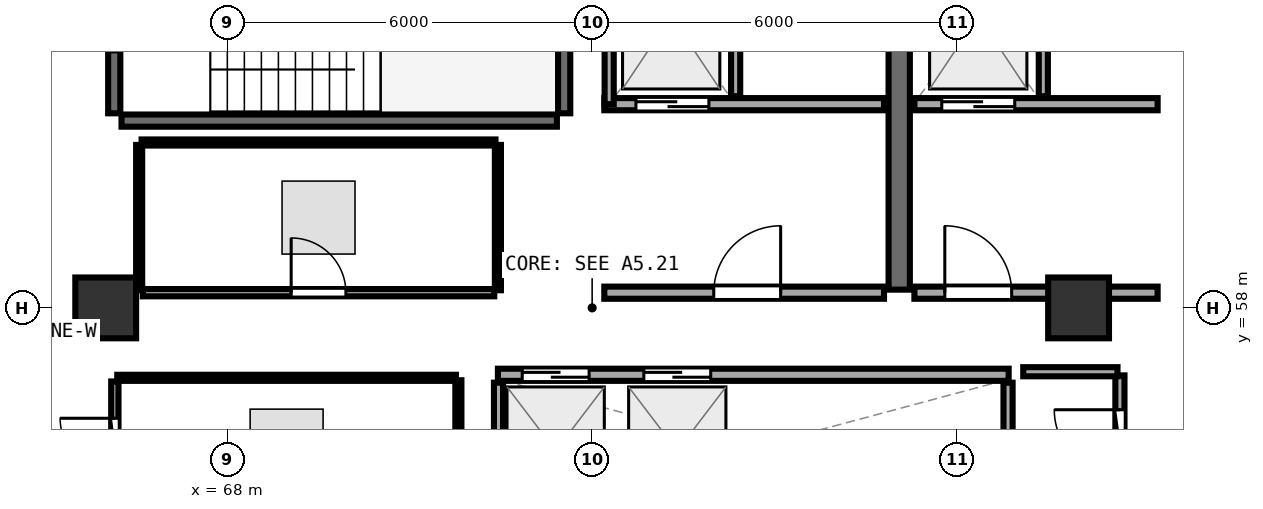
"""IFC4 building model, lengths in metres.
Left out: names, types, materials, properties, quantities, classifications, styles, units other than length and angle.
Written with IfcOpenShell. Run it as: python <this file> out.ifc"""

import sys

from ifc_helpers import new_model, si_unit, direction, frame, frame_2d, origin, origin_2d, place, context, subcontext, project, spatial, rectangle, extrude, element, fill, save


model = new_model("IFC4")
c1 = context("Model", 3, precision=1e-05, world=origin(), true_north=direction((0.0, 1.0)))
c2 = subcontext(c1, "Body", "Model", "MODEL_VIEW")
j1 = project(units=[si_unit("LENGTHUNIT", "METRE"), si_unit("PLANEANGLEUNIT", "RADIAN")], contexts=[c1])
p1 = place(None, origin())
s1 = spatial("IfcSite", under=j1, at=p1, CompositionType="ELEMENT")
p2 = place(p1, origin())
s2 = spatial("IfcBuilding", under=s1, at=p2, CompositionType="ELEMENT")
p3 = place(p2, frame((0.0, 0.0, 289.95)))
s3 = spatial("IfcBuildingStorey", under=s2, at=p3, CompositionType="ELEMENT", Elevation=289.95)
for number, where, z_axis, x_axis in (
    (1, (82.0, 58.0, 0.0), (0.0, 0.0, 1.0), (1.0, 0.0, 0.0)),
    (2, (66.0, 58.0, 0.0), (0.0, 0.0, 1.0), (1.0, 0.0, 0.0)),
):
    element("IfcColumn", number, at=place(p3, frame(where, z_axis=z_axis, x_axis=x_axis)), inside=s3, PredefinedType="PILASTER", context=c2, shape_type="SweptSolid", body=[
        extrude(rectangle(XDim=1.0, YDim=1.0, at=origin_2d()), origin(), (0.0, 0.0, 1.0), 3.75),
    ])
p4 = place(p3, frame((66.26, 61.08, 0.0), z_axis=(0.0, 0.0, 1.0), x_axis=(1.0, 0.0, 0.0)))
e3 = element("IfcWall", 3, at=p4, inside=s3, PredefinedType="SHEAR", context=c2, shape_type="SweptSolid", body=[
    extrude(rectangle(XDim=7.16, YDim=0.2, at=frame_2d((3.58, 0.0))), origin(), (0.0, 0.0, 1.0), 3.43),
])
p5 = place(p3, frame((73.54, 61.2, 0.0), z_axis=(0.0, 0.0, 1.0), x_axis=(0.0, 1.0, 0.0)))
e4 = element("IfcWall", 4, at=p5, inside=s3, PredefinedType="SHEAR", context=c2, shape_type="SweptSolid", body=[
    extrude(rectangle(XDim=3.07, YDim=0.2, at=frame_2d((1.535, 0.0))), origin(), (0.0, 0.0, 1.0), 3.43),
])
p6 = place(p3, frame((66.14, 64.27, 0.0), z_axis=(0.0, 0.0, 1.0), x_axis=(0.0, -1.0, 0.0)))
e5 = element("IfcWall", 5, at=p6, inside=s3, PredefinedType="SHEAR", context=c2, shape_type="SweptSolid", body=[
    extrude(rectangle(XDim=3.07, YDim=0.2, at=frame_2d((1.535, 0.0))), origin(), (0.0, 0.0, 1.0), 3.43),
])
p7 = place(p6, frame((1.01, 0.0, 0.0)))
e6 = element("IfcOpeningElement", 6, at=p7, cuts=e5, PredefinedType="OPENING", context=c2, shape_type="SweptSolid", body=[
    extrude(rectangle(XDim=1.05, YDim=2.1, at=frame_2d((0.525, 1.05))), frame((0.0, 0.11, 0.0), z_axis=(0.0, -1.0, 0.0), x_axis=(1.0, 0.0, 0.0)), (0.0, 0.0, 1.0), 0.22),
])
p8 = place(p3, frame((79.05, 58.3, 0.0), z_axis=(0.0, 0.0, 1.0), x_axis=(0.0, 1.0, 0.0)))
e7 = element("IfcWall", 7, at=p8, inside=s3, PredefinedType="SHEAR", context=c2, shape_type="SweptSolid", body=[
    extrude(rectangle(XDim=6.3, YDim=0.35, at=frame_2d((3.15, 0.0))), origin(), (0.0, 0.0, 1.0), 3.43),
])
p9 = place(p3, frame((74.2, 61.35, 0.0), z_axis=(0.0, 0.0, 1.0), x_axis=(1.0, 0.0, 0.0)))
e8 = element("IfcWall", 8, at=p9, inside=s3, PredefinedType="SOLIDWALL", context=c2, shape_type="SweptSolid", body=[
    extrude(rectangle(XDim=4.6, YDim=0.2, at=frame_2d((2.3, 0.0))), origin(), (0.0, 0.0, 1.0), 3.42),
])
p10 = place(p9, frame((0.52, 0.0, 0.0)))
e9 = element("IfcOpeningElement", 9, at=p10, cuts=e8, PredefinedType="OPENING", context=c2, shape_type="SweptSolid", body=[
    extrude(rectangle(XDim=1.2, YDim=2.15, at=frame_2d((0.6, 1.075))), frame((0.0, 0.11, 0.0), z_axis=(0.0, -1.0, 0.0), x_axis=(1.0, 0.0, 0.0)), (0.0, 0.0, 1.0), 0.22),
])
p11 = place(p3, frame((74.28, 61.35, 0.0), z_axis=(0.0, 0.0, 1.0), x_axis=(0.0, 1.0, 0.0)))
e10 = element("IfcWall", 10, at=p11, inside=s3, PredefinedType="PARTITIONING", context=c2, shape_type="SweptSolid", body=[
    extrude(rectangle(XDim=2.97, YDim=0.15, at=frame_2d((1.485, 0.0))), origin(), (0.0, 0.0, 1.0), 3.42),
])
p12 = place(p3, frame((76.36, 61.48, 0.0), z_axis=(0.0, 0.0, 1.0), x_axis=(0.0, 1.0, 0.0)))
e11 = element("IfcWall", 11, at=p12, inside=s3, PredefinedType="PARTITIONING", context=c2, shape_type="SweptSolid", body=[
    extrude(rectangle(XDim=2.84, YDim=0.15, at=frame_2d((1.42, 0.0))), origin(), (0.0, 0.0, 1.0), 3.42),
])
p13 = place(p3, frame((79.3, 61.35, 0.0), z_axis=(0.0, 0.0, 1.0), x_axis=(1.0, 0.0, 0.0)))
e12 = element("IfcWall", 12, at=p13, inside=s3, PredefinedType="SOLIDWALL", context=c2, shape_type="SweptSolid", body=[
    extrude(rectangle(XDim=4.0, YDim=0.2, at=frame_2d((2.0, 0.0))), origin(), (0.0, 0.0, 1.0), 2.715),
])
p14 = place(p13, frame((0.45, 0.0, 0.0)))
e13 = element("IfcOpeningElement", 13, at=p14, cuts=e12, PredefinedType="OPENING", context=c2, shape_type="SweptSolid", body=[
    extrude(rectangle(XDim=1.2, YDim=2.15, at=frame_2d((0.6, 1.075))), frame((0.0, 0.11, 0.0), z_axis=(0.0, -1.0, 0.0), x_axis=(1.0, 0.0, 0.0)), (0.0, 0.0, 1.0), 0.22),
])
p15 = place(p3, frame((81.42, 61.48, 0.0), z_axis=(0.0, 0.0, 1.0), x_axis=(0.0, 1.0, 0.0)))
e14 = element("IfcWall", 14, at=p15, inside=s3, PredefinedType="PARTITIONING", context=c2, shape_type="SweptSolid", body=[
    extrude(rectangle(XDim=2.84, YDim=0.15, at=frame_2d((1.42, 0.0))), origin(), (0.0, 0.0, 1.0), 3.42),
])
p16 = place(p3, frame((74.2, 58.25, 0.0), z_axis=(0.0, 0.0, 1.0), x_axis=(1.0, 0.0, 0.0)))
e15 = element("IfcWall", 15, at=p16, inside=s3, PredefinedType="SOLIDWALL", context=c2, shape_type="SweptSolid", body=[
    extrude(rectangle(XDim=4.6, YDim=0.2, at=frame_2d((2.3, 0.0))), origin(), (0.0, 0.0, 1.0), 3.42),
])
p17 = place(p16, frame((1.8, 0.0, 0.0)))
e16 = element("IfcOpeningElement", 16, at=p17, cuts=e15, PredefinedType="OPENING", context=c2, shape_type="SweptSolid", body=[
    extrude(rectangle(XDim=1.1, YDim=2.1, at=frame_2d((0.55, 1.05))), frame((0.0, 0.11, 0.0), z_axis=(0.0, -1.0, 0.0), x_axis=(1.0, 0.0, 0.0)), (0.0, 0.0, 1.0), 0.22),
])
p18 = place(p3, frame((79.3, 58.25, 0.0), z_axis=(0.0, 0.0, 1.0), x_axis=(1.0, 0.0, 0.0)))
e17 = element("IfcWall", 17, at=p18, inside=s3, PredefinedType="SOLIDWALL", context=c2, shape_type="SweptSolid", body=[
    extrude(rectangle(XDim=4.0, YDim=0.2, at=frame_2d((2.0, 0.0))), origin(), (0.0, 0.0, 1.0), 2.715),
])
p19 = place(p18, frame((0.5, 0.0, 0.0)))
e18 = element("IfcOpeningElement", 18, at=p19, cuts=e17, PredefinedType="OPENING", context=c2, shape_type="SweptSolid", body=[
    extrude(rectangle(XDim=1.1, YDim=2.1, at=frame_2d((0.55, 1.05))), frame((0.0, 0.11, 0.0), z_axis=(0.0, -1.0, 0.0), x_axis=(1.0, 0.0, 0.0)), (0.0, 0.0, 1.0), 0.22),
])
p20 = place(p3, frame((72.45, 56.9, 0.0), z_axis=(0.0, 0.0, 1.0), x_axis=(1.0, 0.0, 0.0)))
e19 = element("IfcWall", 19, at=p20, inside=s3, PredefinedType="SOLIDWALL", context=c2, shape_type="SweptSolid", body=[
    extrude(rectangle(XDim=8.4, YDim=0.2, at=frame_2d((4.2, 0.0))), origin(), (0.0, 0.0, 1.0), 3.42),
])
p21 = place(p20, frame((0.4, 0.0, 0.0)))
e20 = element("IfcOpeningElement", 20, at=p21, cuts=e19, PredefinedType="OPENING", context=c2, shape_type="SweptSolid", body=[
    extrude(rectangle(XDim=1.1, YDim=2.1, at=frame_2d((0.55, 1.05))), frame((0.0, 0.11, 0.0), z_axis=(0.0, -1.0, 0.0), x_axis=(1.0, 0.0, 0.0)), (0.0, 0.0, 1.0), 0.22),
])
p22 = place(p20, frame((2.4, 0.0, 0.0)))
e21 = element("IfcOpeningElement", 21, at=p22, cuts=e19, PredefinedType="OPENING", context=c2, shape_type="SweptSolid", body=[
    extrude(rectangle(XDim=1.1, YDim=2.1, at=frame_2d((0.55, 1.05))), frame((0.0, 0.11, 0.0), z_axis=(0.0, -1.0, 0.0), x_axis=(1.0, 0.0, 0.0)), (0.0, 0.0, 1.0), 0.22),
])
for number, where, z_axis, x_axis in (
    (22, (72.46, 54.48, 0.0), (0.0, 0.0, 1.0), (0.0, 1.0, 0.0)),
    (23, (80.84, 54.48, 0.0), (0.0, 0.0, 1.0), (0.0, 1.0, 0.0)),
):
    element("IfcWall", number, at=place(p3, frame(where, z_axis=z_axis, x_axis=x_axis)), inside=s3, PredefinedType="PARTITIONING", context=c2, shape_type="SweptSolid", body=[
        extrude(rectangle(XDim=2.29, YDim=0.15, at=frame_2d((1.145, 0.0))), origin(), (0.0, 0.0, 1.0), 3.42),
    ])
p23 = place(p3, frame((82.68, 54.68, 0.0), z_axis=(0.0, 0.0, 1.0), x_axis=(0.0, 1.0, 0.0)))
e24 = element("IfcWall", 24, at=p23, inside=s3, PredefinedType="PARTITIONING", context=c2, shape_type="SweptSolid", body=[
    extrude(rectangle(XDim=2.21, YDim=0.15, at=frame_2d((1.105, 0.0))), origin(), (0.0, 0.0, 1.0), 3.42),
])
p24 = place(p23, frame((0.565, 0.0, 0.0)))
e25 = element("IfcOpeningElement", 25, at=p24, cuts=e24, PredefinedType="OPENING", context=c2, shape_type="SweptSolid", body=[
    extrude(rectangle(XDim=1.08, YDim=2.1, at=frame_2d((0.54, 1.05))), frame((0.0, 0.085, 0.0), z_axis=(0.0, -1.0, 0.0), x_axis=(1.0, 0.0, 0.0)), (0.0, 0.0, 1.0), 0.17),
])
p25 = place(p3, frame((66.61, 58.25, 0.0), z_axis=(0.0, 0.0, 1.0), x_axis=(1.0, 0.0, 0.0)))
e26 = element("IfcWall", 26, at=p25, inside=s3, PredefinedType="PARTITIONING", context=c2, shape_type="SweptSolid", body=[
    extrude(rectangle(XDim=5.78, YDim=0.12, at=frame_2d((2.89, 0.0))), origin(), (0.0, 0.0, 1.0), 3.42),
])
p26 = place(p25, frame((2.44, 0.0, 0.0)))
e27 = element("IfcOpeningElement", 27, at=p26, cuts=e26, PredefinedType="OPENING", context=c2, shape_type="SweptSolid", body=[
    extrude(rectangle(XDim=0.9, YDim=2.08, at=frame_2d((0.45, 1.04))), frame((0.0, 0.07, 0.0), z_axis=(0.0, -1.0, 0.0), x_axis=(1.0, 0.0, 0.0)), (0.0, 0.0, 1.0), 0.14),
])
p27 = place(p3, frame((66.15, 54.68, 0.0), z_axis=(0.0, 0.0, 1.0), x_axis=(0.0, 1.0, 0.0)))
e28 = element("IfcWall", 28, at=p27, inside=s3, PredefinedType="PARTITIONING", context=c2, shape_type="SweptSolid", body=[
    extrude(rectangle(XDim=2.11, YDim=0.12, at=frame_2d((1.055, 0.0))), origin(), (0.0, 0.0, 1.0), 2.715),
])
p28 = place(p27, frame((0.605, 0.0, 0.0)))
e29 = element("IfcOpeningElement", 29, at=p28, cuts=e28, PredefinedType="OPENING", context=c2, shape_type="SweptSolid", body=[
    extrude(rectangle(XDim=0.9, YDim=2.08, at=frame_2d((0.45, 1.04))), frame((0.0, 0.07, 0.0), z_axis=(0.0, -1.0, 0.0), x_axis=(1.0, 0.0, 0.0)), (0.0, 0.0, 1.0), 0.14),
])
p29 = place(p3, frame((82.64, 56.95, 0.0), z_axis=(0.0, 0.0, 1.0), x_axis=(-1.0, 0.0, 0.0)))
e30 = element("IfcWall", 30, at=p29, inside=s3, PredefinedType="PARTITIONING", context=c2, shape_type="SweptSolid", body=[
    extrude(rectangle(XDim=1.55, YDim=0.15, at=frame_2d((0.775, 0.0))), origin(), (0.0, 0.0, 1.0), 2.715),
])
p30 = place(p3, frame((72.45, 58.29, 0.0), z_axis=(0.0, 0.0, 1.0), x_axis=(0.0, 1.0, 0.0)))
e31 = element("IfcWall", 31, at=p30, inside=s3, PredefinedType="PARTITIONING", context=c2, shape_type="SweptSolid", body=[
    extrude(rectangle(XDim=2.39, YDim=0.1, at=frame_2d((1.195, 0.0))), origin(), (0.0, 0.0, 1.0), 3.42),
])
p31 = place(p3, frame((72.41, 60.72, 0.0), z_axis=(0.0, 0.0, 1.0), x_axis=(-1.0, 0.0, 0.0)))
e32 = element("IfcWall", 32, at=p31, inside=s3, PredefinedType="PARTITIONING", context=c2, shape_type="SweptSolid", body=[
    extrude(rectangle(XDim=5.82, YDim=0.1, at=frame_2d((2.91, 0.0))), origin(), (0.0, 0.0, 1.0), 3.42),
])
p32 = place(p3, frame((66.55, 60.68, 0.0), z_axis=(0.0, 0.0, 1.0), x_axis=(0.0, -1.0, 0.0)))
e33 = element("IfcWall", 33, at=p32, inside=s3, PredefinedType="PARTITIONING", context=c2, shape_type="SweptSolid", body=[
    extrude(rectangle(XDim=2.39, YDim=0.1, at=frame_2d((1.195, 0.0))), origin(), (0.0, 0.0, 1.0), 3.42),
])
p33 = place(p3, frame((71.8, 54.66, 0.0), z_axis=(0.0, 0.0, 1.0), x_axis=(0.0, 1.0, 0.0)))
e34 = element("IfcWall", 34, at=p33, inside=s3, PredefinedType="PARTITIONING", context=c2, shape_type="SweptSolid", body=[
    extrude(rectangle(XDim=2.15, YDim=0.1, at=frame_2d((1.075, 0.0))), origin(), (0.0, 0.0, 1.0), 3.42),
])
p34 = place(p3, frame((71.76, 56.85, 0.0), z_axis=(0.0, 0.0, 1.0), x_axis=(-1.0, 0.0, 0.0)))
e35 = element("IfcWall", 35, at=p34, inside=s3, PredefinedType="PARTITIONING", context=c2, shape_type="SweptSolid", body=[
    extrude(rectangle(XDim=5.57, YDim=0.1, at=frame_2d((2.785, 0.0))), origin(), (0.0, 0.0, 1.0), 2.715),
])
p35 = place(p10, origin())
e36 = element("IfcDoor", 36, at=p35, inside=s3, OperationType="DOUBLE_DOOR_SLIDING", PredefinedType="DOOR", context=c2, shape_type="SweptSolid", body=[
    extrude(rectangle(XDim=1.2, YDim=2.15, at=frame_2d((0.6, 1.075))), frame((0.0, 0.025, 0.0), z_axis=(0.0, -1.0, 0.0), x_axis=(1.0, 0.0, 0.0)), (0.0, 0.0, 1.0), 0.05),
])
fill(e9, e36)
p36 = place(p14, origin())
e37 = element("IfcDoor", 37, at=p36, inside=s3, OperationType="DOUBLE_DOOR_SLIDING", PredefinedType="DOOR", context=c2, shape_type="SweptSolid", body=[
    extrude(rectangle(XDim=1.2, YDim=2.15, at=frame_2d((0.6, 1.075))), frame((0.0, 0.025, 0.0), z_axis=(0.0, -1.0, 0.0), x_axis=(1.0, 0.0, 0.0)), (0.0, 0.0, 1.0), 0.05),
])
fill(e13, e37)
p37 = place(p17, frame((1.1, 0.0, 0.0), z_axis=(0.0, 0.0, 1.0), x_axis=(-1.0, 0.0, 0.0)))
e38 = element("IfcDoor", 38, at=p37, inside=s3, OperationType="SINGLE_SWING_LEFT", PredefinedType="DOOR", context=c2, shape_type="SweptSolid", body=[
    extrude(rectangle(XDim=1.1, YDim=2.1, at=frame_2d((0.55, 1.05))), frame((0.0, 0.025, 0.0), z_axis=(0.0, -1.0, 0.0), x_axis=(1.0, 0.0, 0.0)), (0.0, 0.0, 1.0), 0.05),
])
fill(e16, e38)
p38 = place(p19, frame((1.1, 0.0, 0.0), z_axis=(0.0, 0.0, 1.0), x_axis=(-1.0, 0.0, 0.0)))
e39 = element("IfcDoor", 39, at=p38, inside=s3, OperationType="SINGLE_SWING_RIGHT", PredefinedType="DOOR", context=c2, shape_type="SweptSolid", body=[
    extrude(rectangle(XDim=1.1, YDim=2.1, at=frame_2d((0.55, 1.05))), frame((0.0, 0.025, 0.0), z_axis=(0.0, -1.0, 0.0), x_axis=(1.0, 0.0, 0.0)), (0.0, 0.0, 1.0), 0.05),
])
fill(e18, e39)
p39 = place(p21, origin())
e40 = element("IfcDoor", 40, at=p39, inside=s3, OperationType="DOUBLE_DOOR_SLIDING", PredefinedType="DOOR", context=c2, shape_type="SweptSolid", body=[
    extrude(rectangle(XDim=1.1, YDim=2.1, at=frame_2d((0.55, 1.05))), frame((0.0, 0.025, 0.0), z_axis=(0.0, -1.0, 0.0), x_axis=(1.0, 0.0, 0.0)), (0.0, 0.0, 1.0), 0.05),
])
fill(e20, e40)
p40 = place(p22, origin())
e41 = element("IfcDoor", 41, at=p40, inside=s3, OperationType="DOUBLE_DOOR_SLIDING", PredefinedType="DOOR", context=c2, shape_type="SweptSolid", body=[
    extrude(rectangle(XDim=1.1, YDim=2.1, at=frame_2d((0.55, 1.05))), frame((0.0, 0.025, 0.0), z_axis=(0.0, -1.0, 0.0), x_axis=(1.0, 0.0, 0.0)), (0.0, 0.0, 1.0), 0.05),
])
fill(e21, e41)
p41 = place(p24, origin())
e42 = element("IfcDoor", 42, at=p41, inside=s3, OperationType="SINGLE_SWING_RIGHT", PredefinedType="DOOR", context=c2, shape_type="SweptSolid", body=[
    extrude(rectangle(XDim=1.08, YDim=2.1, at=frame_2d((0.54, 1.05))), frame((0.0, 0.025, 0.0), z_axis=(0.0, -1.0, 0.0), x_axis=(1.0, 0.0, 0.0)), (0.0, 0.0, 1.0), 0.05),
])
fill(e25, e42)
p42 = place(p26, origin())
e43 = element("IfcDoor", 43, at=p42, inside=s3, OperationType="SINGLE_SWING_LEFT", PredefinedType="DOOR", context=c2, shape_type="SweptSolid", body=[
    extrude(rectangle(XDim=0.9, YDim=2.08, at=frame_2d((0.45, 1.04))), frame((0.0, 0.025, 0.0), z_axis=(0.0, -1.0, 0.0), x_axis=(1.0, 0.0, 0.0)), (0.0, 0.0, 1.0), 0.05),
])
fill(e27, e43)
p43 = place(p28, origin())
e44 = element("IfcDoor", 44, at=p43, inside=s3, OperationType="SINGLE_SWING_RIGHT", PredefinedType="DOOR", context=c2, shape_type="SweptSolid", body=[
    extrude(rectangle(XDim=0.9, YDim=2.08, at=frame_2d((0.45, 1.04))), frame((0.0, 0.025, 0.0), z_axis=(0.0, -1.0, 0.0), x_axis=(1.0, 0.0, 0.0)), (0.0, 0.0, 1.0), 0.05),
])
fill(e29, e44)
save(model, sys.argv[1])
